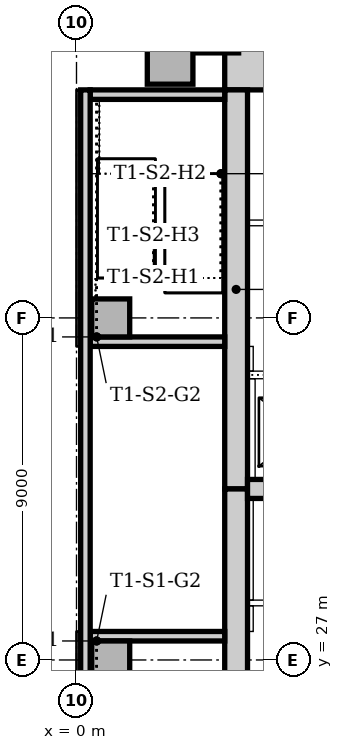
"""IFC4 building model, lengths in metres.
Left out: names, types, materials, properties, quantities, classifications, styles, units other than length and angle.
Written with IfcOpenShell. Run it as: python <this file> out.ifc"""

import sys

from ifc_helpers import new_model, si_unit, direction, frame, frame_2d, origin, origin_2d, place, context, subcontext, project, spatial, rectangle, extrude, element, fill, save


model = new_model("IFC4")
c1 = context("Model", 3, precision=1e-05, world=origin(), true_north=direction((0.0, 1.0)))
c2 = subcontext(c1, "Body", "Model", "MODEL_VIEW")
j1 = project(units=[si_unit("LENGTHUNIT", "METRE"), si_unit("PLANEANGLEUNIT", "RADIAN")], contexts=[c1])
p1 = place(None, origin())
s1 = spatial("IfcSite", under=j1, at=p1, CompositionType="ELEMENT")
p2 = place(p1, origin())
s2 = spatial("IfcBuilding", under=s1, at=p2, CompositionType="ELEMENT")
p3 = place(p2, frame((0.0, 0.0, 11.0)))
s3 = spatial("IfcBuildingStorey", under=s2, at=p3, CompositionType="ELEMENT", Elevation=11.0)
p4 = place(p3, frame((23.7, 42.6, 0.0), z_axis=(0.0, 0.0, 1.0), x_axis=(-1.0, 0.0, 0.0)))
e1 = element("IfcWall", 1, at=p4, inside=s3, PredefinedType="SOLIDWALL", context=c2, shape_type="SweptSolid", body=[
    extrude(rectangle(XDim=19.8, YDim=1.2, at=frame_2d((9.9, 0.0))), origin(), (0.0, 0.0, 1.0), 5.0),
])
p5 = place(p3, frame((4.2, 42.0, 0.0), z_axis=(0.0, 0.0, 1.0), x_axis=(0.0, -1.0, 0.0)))
e2 = element("IfcWall", 2, at=p5, inside=s3, PredefinedType="SOLIDWALL", context=c2, shape_type="SweptSolid", body=[
    extrude(rectangle(XDim=10.5, YDim=0.6, at=frame_2d((5.25, 0.0))), origin(), (0.0, 0.0, 1.0), 5.0),
])
p6 = place(p5, frame((5.3, 0.0, 0.0)))
e3 = element("IfcOpeningElement", 3, at=p6, cuts=e2, PredefinedType="OPENING", context=c2, shape_type="SweptSolid", body=[
    extrude(rectangle(XDim=1.0, YDim=2.1, at=frame_2d((0.5, 1.05))), frame((0.0, 0.31, 0.0), z_axis=(0.0, -1.0, 0.0), x_axis=(1.0, 0.0, 0.0)), (0.0, 0.0, 1.0), 0.62),
])
p7 = place(p3, frame((4.2, 31.5, 0.0), z_axis=(0.0, 0.0, 1.0), x_axis=(0.0, -1.0, 0.0)))
e4 = element("IfcWall", 4, at=p7, inside=s3, PredefinedType="SOLIDWALL", context=c2, shape_type="SweptSolid", body=[
    extrude(rectangle(XDim=10.5, YDim=0.6, at=frame_2d((5.25, 0.0))), origin(), (0.0, 0.0, 1.0), 5.0),
])
p8 = place(p7, frame((4.25, 0.0, 0.0)))
e5 = element("IfcOpeningElement", 5, at=p8, cuts=e4, PredefinedType="OPENING", context=c2, shape_type="SweptSolid", body=[
    extrude(rectangle(XDim=1.0, YDim=2.1, at=frame_2d((0.5, 1.05))), frame((0.0, 0.31, 0.0), z_axis=(0.0, -1.0, 0.0), x_axis=(1.0, 0.0, 0.0)), (0.0, 0.0, 1.0), 0.62),
])
p9 = place(p3, frame((4.5, 31.5, 0.0), z_axis=(0.0, 0.0, 1.0), x_axis=(1.0, 0.0, 0.0)))
e6 = element("IfcWall", 6, at=p9, inside=s3, PredefinedType="SOLIDWALL", context=c2, shape_type="SweptSolid", body=[
    extrude(rectangle(XDim=18.0, YDim=0.5, at=frame_2d((9.0, 0.0))), origin(), (0.0, 0.0, 1.0), 5.0),
])
p10 = place(p3, frame((3.9, 27.625, 0.0), z_axis=(0.0, 0.0, 1.0), x_axis=(-1.0, 0.0, 0.0)))
e7 = element("IfcWall", 7, at=p10, inside=s3, PredefinedType="SOLIDWALL", context=c2, shape_type="SweptSolid", body=[
    extrude(rectangle(XDim=3.54, YDim=0.25, at=frame_2d((1.77, 0.0))), origin(), (0.0, 0.0, 1.0), 5.0),
])
p11 = place(p10, frame((0.4, 0.0, 0.0)))
e8 = element("IfcOpeningElement", 8, at=p11, cuts=e7, PredefinedType="OPENING", context=c2, shape_type="SweptSolid", body=[
    extrude(rectangle(XDim=1.0, YDim=2.1, at=frame_2d((0.5, 1.05))), frame((0.0, 0.135, 0.0), z_axis=(0.0, -1.0, 0.0), x_axis=(1.0, 0.0, 0.0)), (0.0, 0.0, 1.0), 0.27),
])
p12 = place(p3, frame((0.36, 35.375, 0.0), z_axis=(0.0, 0.0, 1.0), x_axis=(1.0, 0.0, 0.0)))
e9 = element("IfcWall", 9, at=p12, inside=s3, PredefinedType="SOLIDWALL", context=c2, shape_type="SweptSolid", body=[
    extrude(rectangle(XDim=3.54, YDim=0.25, at=frame_2d((1.77, 0.0))), origin(), (0.0, 0.0, 1.0), 5.0),
])
p13 = place(p12, frame((2.14, 0.0, 0.0)))
e10 = element("IfcOpeningElement", 10, at=p13, cuts=e9, PredefinedType="OPENING", context=c2, shape_type="SweptSolid", body=[
    extrude(rectangle(XDim=1.0, YDim=2.1, at=frame_2d((0.5, 1.05))), frame((0.0, 0.135, 0.0), z_axis=(0.0, -1.0, 0.0), x_axis=(1.0, 0.0, 0.0)), (0.0, 0.0, 1.0), 0.27),
])
p14 = place(p3, frame((3.9, 41.875, 0.0), z_axis=(0.0, 0.0, 1.0), x_axis=(-1.0, 0.0, 0.0)))
e11 = element("IfcWall", 11, at=p14, inside=s3, PredefinedType="SOLIDWALL", context=c2, shape_type="SweptSolid", body=[
    extrude(rectangle(XDim=3.54, YDim=0.25, at=frame_2d((1.77, 0.0))), origin(), (0.0, 0.0, 1.0), 5.0),
])
p15 = place(p3, frame((0.235, 21.0, 0.0), z_axis=(0.0, 0.0, 1.0), x_axis=(0.0, 1.0, 0.0)))
e12 = element("IfcWall", 12, at=p15, inside=s3, PredefinedType="SOLIDWALL", context=c2, shape_type="SweptSolid", body=[
    extrude(rectangle(XDim=21.0, YDim=0.25, at=frame_2d((10.5, 0.0))), origin(), (0.0, 0.0, 1.0), 5.0),
])
for number, where, z_axis, x_axis in (
    (13, (3.667, 43.574, 0.0), (0.0, 0.0, 1.0), (1.0, 0.0, 0.0)),
    (14, (2.463, 42.75, 0.0), (0.0, 0.0, 1.0), (1.0, 0.0, 0.0)),
):
    element("IfcColumn", number, at=place(p3, frame(where, z_axis=z_axis, x_axis=x_axis)), inside=s3, PredefinedType="COLUMN", context=c2, shape_type="SweptSolid", body=[
        extrude(rectangle(XDim=1.2, YDim=1.2, at=origin_2d()), origin(), (0.0, 0.0, 1.0), 4.7),
    ])
for number, where, z_axis, x_axis in (
    (15, (0.9, 27.0, 0.0), (0.0, 0.0, 1.0), (1.0, 0.0, 0.0)),
    (16, (0.9, 36.0, 0.0), (0.0, 0.0, 1.0), (1.0, 0.0, 0.0)),
):
    element("IfcColumn", number, at=place(p3, frame(where, z_axis=z_axis, x_axis=x_axis)), inside=s3, PredefinedType="COLUMN", context=c2, shape_type="SweptSolid", body=[
        extrude(rectangle(XDim=1.0, YDim=1.0, at=origin_2d()), origin(), (0.0, 0.0, 1.0), 5.0),
    ])
p16 = place(p3, frame((0.48, 39.795, 0.0), z_axis=(0.0, 0.0, 1.0), x_axis=(0.0, 1.0, 0.0)))
e17 = element("IfcWall", 17, at=p16, inside=s3, PredefinedType="STANDARD", context=c2, shape_type="SweptSolid", body=[
    extrude(rectangle(XDim=1.955, YDim=0.24, at=frame_2d((0.978, 0.0))), origin(), (0.0, 0.0, 1.0), 5.0),
])
p17 = place(p3, frame((4.5, 34.5, 0.0), z_axis=(0.0, 0.0, 1.0), x_axis=(1.0, 0.0, 0.0)))
e18 = element("IfcWall", 18, at=p17, inside=s3, PredefinedType="PARTITIONING", context=c2, shape_type="SweptSolid", body=[
    extrude(rectangle(XDim=18.0, YDim=0.2, at=frame_2d((9.0, 0.0))), origin(), (0.0, 0.0, 1.0), 4.7),
])
p18 = place(p17, frame((0.95, 0.0, 0.0)))
e19 = element("IfcOpeningElement", 19, at=p18, cuts=e18, PredefinedType="OPENING", context=c2, shape_type="SweptSolid", body=[
    extrude(rectangle(XDim=1.1, YDim=2.1, at=frame_2d((0.55, 1.05))), frame((0.0, 0.11, 0.0), z_axis=(0.0, -1.0, 0.0), x_axis=(1.0, 0.0, 0.0)), (0.0, 0.0, 1.0), 0.22),
])
p19 = place(p17, frame((3.95, 0.0, 0.0)))
e20 = element("IfcOpeningElement", 20, at=p19, cuts=e18, PredefinedType="OPENING", context=c2, shape_type="SweptSolid", body=[
    extrude(rectangle(XDim=1.1, YDim=2.1, at=frame_2d((0.55, 1.05))), frame((0.0, 0.11, 0.0), z_axis=(0.0, -1.0, 0.0), x_axis=(1.0, 0.0, 0.0)), (0.0, 0.0, 1.0), 0.22),
])
p20 = place(p17, frame((12.95, 0.0, 0.0)))
e21 = element("IfcOpeningElement", 21, at=p20, cuts=e18, PredefinedType="OPENING", context=c2, shape_type="SweptSolid", body=[
    extrude(rectangle(XDim=1.1, YDim=2.1, at=frame_2d((0.55, 1.05))), frame((0.0, 0.11, 0.0), z_axis=(0.0, -1.0, 0.0), x_axis=(1.0, 0.0, 0.0)), (0.0, 0.0, 1.0), 0.22),
])
p21 = place(p17, frame((15.95, 0.0, 0.0)))
e22 = element("IfcOpeningElement", 22, at=p21, cuts=e18, PredefinedType="OPENING", context=c2, shape_type="SweptSolid", body=[
    extrude(rectangle(XDim=1.1, YDim=2.1, at=frame_2d((0.55, 1.05))), frame((0.0, 0.11, 0.0), z_axis=(0.0, -1.0, 0.0), x_axis=(1.0, 0.0, 0.0)), (0.0, 0.0, 1.0), 0.22),
])
p22 = place(p3, frame((4.6, 31.75, 0.0), z_axis=(0.0, 0.0, 1.0), x_axis=(0.0, 1.0, 0.0)))
e23 = element("IfcWall", 23, at=p22, inside=s3, PredefinedType="PARTITIONING", context=c2, shape_type="SweptSolid", body=[
    extrude(rectangle(XDim=2.65, YDim=0.2, at=frame_2d((1.325, 0.0))), origin(), (0.0, 0.0, 1.0), 4.7),
])
p23 = place(p3, frame((4.5, 28.5, 0.0), z_axis=(0.0, 0.0, 1.0), x_axis=(1.0, 0.0, 0.0)))
e24 = element("IfcWall", 24, at=p23, inside=s3, PredefinedType="PARTITIONING", context=c2, shape_type="SweptSolid", body=[
    extrude(rectangle(XDim=18.0, YDim=0.15, at=frame_2d((9.0, 0.0))), origin(), (0.0, 0.0, 1.0), 4.7),
])
p24 = place(p23, frame((4.1, 0.0, 0.0)))
e25 = element("IfcOpeningElement", 25, at=p24, cuts=e24, PredefinedType="OPENING", context=c2, shape_type="SweptSolid", body=[
    extrude(rectangle(XDim=0.9, YDim=2.1, at=frame_2d((0.45, 1.05))), frame((0.0, 0.085, 0.0), z_axis=(0.0, -1.0, 0.0), x_axis=(1.0, 0.0, 0.0)), (0.0, 0.0, 1.0), 0.17),
])
p25 = place(p23, frame((10.8, 0.0, 0.0)))
e26 = element("IfcOpeningElement", 26, at=p25, cuts=e24, PredefinedType="OPENING", context=c2, shape_type="SweptSolid", body=[
    extrude(rectangle(XDim=0.9, YDim=2.1, at=frame_2d((0.45, 1.05))), frame((0.0, 0.085, 0.0), z_axis=(0.0, -1.0, 0.0), x_axis=(1.0, 0.0, 0.0)), (0.0, 0.0, 1.0), 0.17),
])
p26 = place(p23, frame((15.2, 0.0, 0.0)))
e27 = element("IfcOpeningElement", 27, at=p26, cuts=e24, PredefinedType="OPENING", context=c2, shape_type="SweptSolid", body=[
    extrude(rectangle(XDim=0.9, YDim=2.1, at=frame_2d((0.45, 1.05))), frame((0.0, 0.085, 0.0), z_axis=(0.0, -1.0, 0.0), x_axis=(1.0, 0.0, 0.0)), (0.0, 0.0, 1.0), 0.17),
])
p27 = place(p3, frame((4.5, 38.5, 0.0), z_axis=(0.0, 0.0, 1.0), x_axis=(1.0, 0.0, 0.0)))
e28 = element("IfcWall", 28, at=p27, inside=s3, PredefinedType="PARTITIONING", context=c2, shape_type="SweptSolid", body=[
    extrude(rectangle(XDim=11.9, YDim=0.15, at=frame_2d((5.95, 0.0))), origin(), (0.0, 0.0, 1.0), 4.7),
])
p28 = place(p27, frame((1.1, 0.0, 0.0)))
e29 = element("IfcOpeningElement", 29, at=p28, cuts=e28, PredefinedType="OPENING", context=c2, shape_type="SweptSolid", body=[
    extrude(rectangle(XDim=0.9, YDim=2.1, at=frame_2d((0.45, 1.05))), frame((0.0, 0.085, 0.0), z_axis=(0.0, -1.0, 0.0), x_axis=(1.0, 0.0, 0.0)), (0.0, 0.0, 1.0), 0.17),
])
p29 = place(p27, frame((4.05, 0.0, 0.0)))
e30 = element("IfcOpeningElement", 30, at=p29, cuts=e28, PredefinedType="OPENING", context=c2, shape_type="SweptSolid", body=[
    extrude(rectangle(XDim=0.9, YDim=2.1, at=frame_2d((0.45, 1.05))), frame((0.0, 0.085, 0.0), z_axis=(0.0, -1.0, 0.0), x_axis=(1.0, 0.0, 0.0)), (0.0, 0.0, 1.0), 0.17),
])
p30 = place(p27, frame((7.05, 0.0, 0.0)))
e31 = element("IfcOpeningElement", 31, at=p30, cuts=e28, PredefinedType="OPENING", context=c2, shape_type="SweptSolid", body=[
    extrude(rectangle(XDim=0.9, YDim=2.1, at=frame_2d((0.45, 1.05))), frame((0.0, 0.085, 0.0), z_axis=(0.0, -1.0, 0.0), x_axis=(1.0, 0.0, 0.0)), (0.0, 0.0, 1.0), 0.17),
])
p31 = place(p27, frame((9.95, 0.0, 0.0)))
e32 = element("IfcOpeningElement", 32, at=p31, cuts=e28, PredefinedType="OPENING", context=c2, shape_type="SweptSolid", body=[
    extrude(rectangle(XDim=0.8, YDim=2.1, at=frame_2d((0.4, 1.05))), frame((0.0, 0.085, 0.0), z_axis=(0.0, -1.0, 0.0), x_axis=(1.0, 0.0, 0.0)), (0.0, 0.0, 1.0), 0.17),
])
p32 = place(p3, frame((4.575, 27.75, 0.0), z_axis=(0.0, 0.0, 1.0), x_axis=(0.0, 1.0, 0.0)))
e33 = element("IfcWall", 33, at=p32, inside=s3, PredefinedType="PARTITIONING", context=c2, shape_type="SweptSolid", body=[
    extrude(rectangle(XDim=0.675, YDim=0.15, at=frame_2d((0.338, 0.0))), origin(), (0.0, 0.0, 1.0), 4.7),
])
p33 = place(p3, frame((4.575, 28.575, 0.0), z_axis=(0.0, 0.0, 1.0), x_axis=(0.0, 1.0, 0.0)))
e34 = element("IfcWall", 34, at=p33, inside=s3, PredefinedType="PARTITIONING", context=c2, shape_type="SweptSolid", body=[
    extrude(rectangle(XDim=2.675, YDim=0.15, at=frame_2d((1.337, 0.0))), origin(), (0.0, 0.0, 1.0), 4.7),
])
p34 = place(p3, frame((4.575, 34.6, 0.0), z_axis=(0.0, 0.0, 1.0), x_axis=(0.0, 1.0, 0.0)))
e35 = element("IfcWall", 35, at=p34, inside=s3, PredefinedType="PARTITIONING", context=c2, shape_type="SweptSolid", body=[
    extrude(rectangle(XDim=0.65, YDim=0.15, at=frame_2d((0.325, 0.0))), origin(), (0.0, 0.0, 1.0), 4.7),
])
p35 = place(p8, frame((1.0, 0.0, 0.0), z_axis=(0.0, 0.0, 1.0), x_axis=(-1.0, 0.0, 0.0)))
e36 = element("IfcDoor", 36, at=p35, inside=s3, OperationType="SINGLE_SWING_RIGHT", PredefinedType="DOOR", context=c2, shape_type="SweptSolid", body=[
    extrude(rectangle(XDim=1.0, YDim=2.1, at=frame_2d((0.5, 1.05))), frame((0.0, 0.025, 0.0), z_axis=(0.0, -1.0, 0.0), x_axis=(1.0, 0.0, 0.0)), (0.0, 0.0, 1.0), 0.05),
])
fill(e5, e36)
p36 = place(p11, origin())
e37 = element("IfcDoor", 37, at=p36, inside=s3, OperationType="SINGLE_SWING_LEFT", PredefinedType="DOOR", context=c2, shape_type="SweptSolid", body=[
    extrude(rectangle(XDim=1.0, YDim=2.1, at=frame_2d((0.5, 1.05))), frame((0.0, 0.025, 0.0), z_axis=(0.0, -1.0, 0.0), x_axis=(1.0, 0.0, 0.0)), (0.0, 0.0, 1.0), 0.05),
])
fill(e8, e37)
p37 = place(p6, frame((1.0, 0.0, 0.0), z_axis=(0.0, 0.0, 1.0), x_axis=(-1.0, 0.0, 0.0)))
e38 = element("IfcDoor", 38, at=p37, inside=s3, OperationType="SINGLE_SWING_LEFT", PredefinedType="DOOR", context=c2, shape_type="SweptSolid", body=[
    extrude(rectangle(XDim=1.0, YDim=2.1, at=frame_2d((0.5, 1.05))), frame((0.0, 0.025, 0.0), z_axis=(0.0, -1.0, 0.0), x_axis=(1.0, 0.0, 0.0)), (0.0, 0.0, 1.0), 0.05),
])
fill(e3, e38)
p38 = place(p13, origin())
e39 = element("IfcDoor", 39, at=p38, inside=s3, OperationType="SINGLE_SWING_RIGHT", PredefinedType="DOOR", context=c2, shape_type="SweptSolid", body=[
    extrude(rectangle(XDim=1.0, YDim=2.1, at=frame_2d((0.5, 1.05))), frame((0.0, 0.025, 0.0), z_axis=(0.0, -1.0, 0.0), x_axis=(1.0, 0.0, 0.0)), (0.0, 0.0, 1.0), 0.05),
])
fill(e10, e39)
save(model, sys.argv[1])
